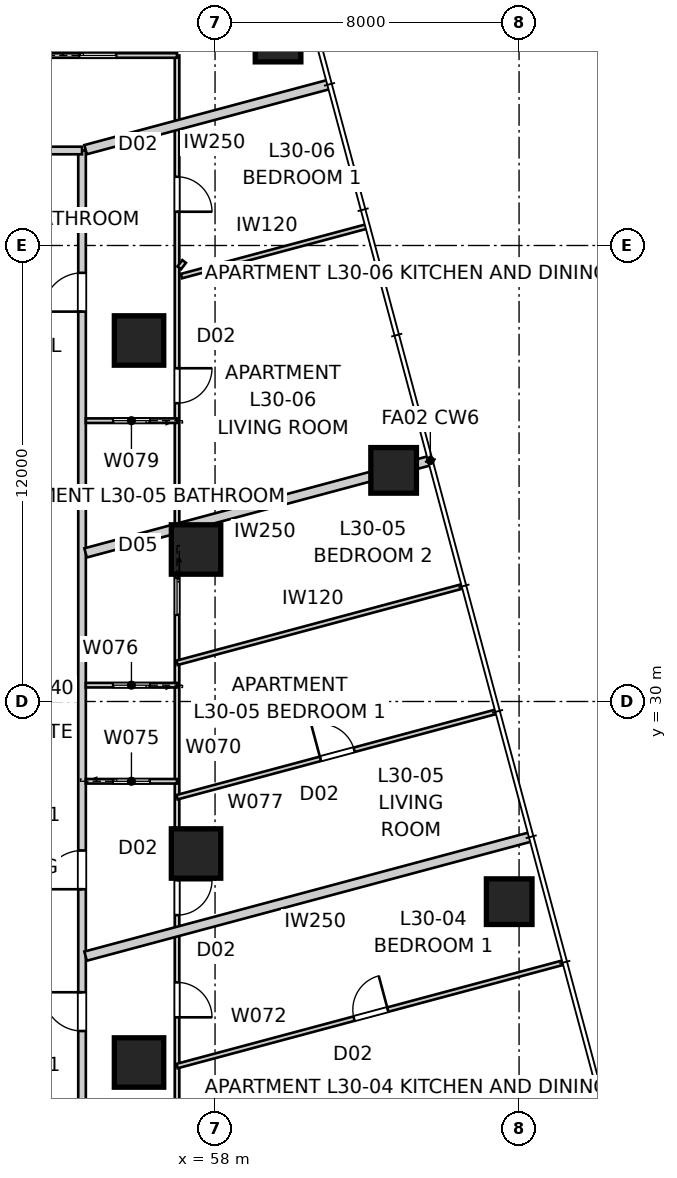
"""IFC4 building model, lengths in metres.
Left out: names, types, materials, properties, quantities, classifications, styles, units other than length and angle.
Written with IfcOpenShell. Run it as: python <this file> out.ifc"""

import sys

from ifc_helpers import new_model, si_unit, direction, frame, frame_2d, origin, origin_2d, place, context, subcontext, project, spatial, rectangle, extrude, element, fill, save


model = new_model("IFC4")
c1 = context("Model", 3, precision=1e-05, world=origin(), true_north=direction((0.0, 1.0)))
c2 = subcontext(c1, "Body", "Model", "MODEL_VIEW")
j1 = project(units=[si_unit("LENGTHUNIT", "METRE"), si_unit("PLANEANGLEUNIT", "RADIAN")], contexts=[c1])
p1 = place(None, origin())
s1 = spatial("IfcSite", under=j1, at=p1, CompositionType="ELEMENT")
p2 = place(p1, origin())
s2 = spatial("IfcBuilding", under=s1, at=p2, CompositionType="ELEMENT")
p3 = place(p2, frame((0.0, 0.0, 111.6)))
s3 = spatial("IfcBuildingStorey", under=s2, at=p3, CompositionType="ELEMENT", Elevation=111.6)
for number, where, z_axis, x_axis in (
    (1, (65.74, 24.733, -0.15), (0.0, 0.0, 1.0), (1.0, 0.0, 0.0)),
    (2, (62.699, 36.082, -0.15), (0.0, 0.0, 1.0), (1.0, 0.0, 0.0)),
    (3, (59.658, 47.432, -0.15), (0.0, 0.0, 1.0), (1.0, 0.0, 0.0)),
):
    element("IfcColumn", number, at=place(p3, frame(where, z_axis=z_axis, x_axis=x_axis)), inside=s3, PredefinedType="COLUMN", context=c2, shape_type="SweptSolid", body=[
        extrude(rectangle(XDim=1.2, YDim=1.2, at=origin_2d()), origin(), (0.0, 0.0, 1.0), 3.55),
    ])
for number, where, z_axis, x_axis in (
    (4, (57.5, 26.0, 0.0), (0.0, 0.0, 1.0), (1.0, 0.0, 0.0)),
    (5, (57.5, 34.0, 0.0), (0.0, 0.0, 1.0), (1.0, 0.0, 0.0)),
    (6, (56.0, 39.5, 0.0), (0.0, 0.0, 1.0), (1.0, 0.0, 0.0)),
    (7, (56.0, 20.5, 0.0), (0.0, 0.0, 1.0), (1.0, 0.0, 0.0)),
):
    element("IfcColumn", number, at=place(p3, frame(where, z_axis=z_axis, x_axis=x_axis)), inside=s3, PredefinedType="COLUMN", context=c2, shape_type="SweptSolid", body=[
        extrude(rectangle(XDim=1.3, YDim=1.3, at=origin_2d()), origin(), (0.0, 0.0, 1.0), 3.4),
    ])
p4 = place(p3, frame((54.5, 15.5, 0.0), z_axis=(0.0, 0.0, 1.0), x_axis=(0.0, 1.0, 0.0)))
e8 = element("IfcWall", 8, at=p4, inside=s3, PredefinedType="PARTITIONING", context=c2, shape_type="SweptSolid", body=[
    extrude(rectangle(XDim=29.0, YDim=0.2, at=frame_2d((14.5, 0.0))), origin(), (0.0, 0.0, 1.0), 3.25),
])
p5 = place(p4, frame((24.76, 0.0, 0.0)))
e9 = element("IfcOpeningElement", 9, at=p5, cuts=e8, PredefinedType="OPENING", context=c2, shape_type="SweptSolid", body=[
    extrude(rectangle(XDim=1.02, YDim=2.1, at=frame_2d((0.51, 1.05))), frame((0.0, 0.11, 0.0), z_axis=(0.0, -1.0, 0.0), x_axis=(1.0, 0.0, 0.0)), (0.0, 0.0, 1.0), 0.22),
])
p6 = place(p4, frame((5.829, 0.0, 0.0)))
e10 = element("IfcOpeningElement", 10, at=p6, cuts=e8, PredefinedType="OPENING", context=c2, shape_type="SweptSolid", body=[
    extrude(rectangle(XDim=1.02, YDim=2.34, at=frame_2d((0.51, 1.17))), frame((0.0, 0.11, 0.0), z_axis=(0.0, -1.0, 0.0), x_axis=(1.0, 0.0, 0.0)), (0.0, 0.0, 1.0), 0.22),
])
p7 = place(p4, frame((9.559, 0.0, 0.0)))
e11 = element("IfcOpeningElement", 11, at=p7, cuts=e8, PredefinedType="OPENING", context=c2, shape_type="SweptSolid", body=[
    extrude(rectangle(XDim=1.02, YDim=2.34, at=frame_2d((0.51, 1.17))), frame((0.0, 0.11, 0.0), z_axis=(0.0, -1.0, 0.0), x_axis=(1.0, 0.0, 0.0)), (0.0, 0.0, 1.0), 0.22),
])
p8 = place(p3, frame((54.5, 44.5, 0.0), z_axis=(0.0, 0.0, 1.0), x_axis=(-1.0, 0.0, 0.0)))
e12 = element("IfcWall", 12, at=p8, inside=s3, PredefinedType="PARTITIONING", context=c2, shape_type="SweptSolid", body=[
    extrude(rectangle(XDim=28.2, YDim=0.2, at=frame_2d((14.1, 0.0))), origin(), (0.0, 0.0, 1.0), 3.25),
])
p9 = place(p8, frame((10.837, 0.0, 0.0)))
e13 = element("IfcOpeningElement", 13, at=p9, cuts=e12, PredefinedType="OPENING", context=c2, shape_type="SweptSolid", body=[
    extrude(rectangle(XDim=1.02, YDim=2.34, at=frame_2d((0.51, 1.17))), frame((0.0, 0.11, 0.0), z_axis=(0.0, -1.0, 0.0), x_axis=(1.0, 0.0, 0.0)), (0.0, 0.0, 1.0), 0.22),
])
p10 = place(p8, frame((5.7, 0.0, 0.0)))
e14 = element("IfcOpeningElement", 14, at=p10, cuts=e12, PredefinedType="OPENING", context=c2, shape_type="SweptSolid", body=[
    extrude(rectangle(XDim=1.02, YDim=2.34, at=frame_2d((0.51, 1.17))), frame((0.0, 0.11, 0.0), z_axis=(0.0, -1.0, 0.0), x_axis=(1.0, 0.0, 0.0)), (0.0, 0.0, 1.0), 0.22),
])
p11 = place(p8, frame((26.127, 0.0, 0.0)))
e15 = element("IfcOpeningElement", 15, at=p11, cuts=e12, PredefinedType="OPENING", context=c2, shape_type="SweptSolid", body=[
    extrude(rectangle(XDim=1.02, YDim=2.34, at=frame_2d((0.51, 1.17))), frame((0.0, 0.11, 0.0), z_axis=(0.0, -1.0, 0.0), x_axis=(1.0, 0.0, 0.0)), (0.0, 0.0, 1.0), 0.22),
])
p12 = place(p3, frame((63.665, 36.341, 0.0), z_axis=(0.0, 0.0, 1.0), x_axis=(-0.965927049013, -0.258814481793, 0.0)))
e16 = element("IfcWall", 16, at=p12, inside=s3, PredefinedType="PARTITIONING", context=c2, shape_type="SweptSolid", body=[
    extrude(rectangle(XDim=9.392, YDim=0.25, at=frame_2d((4.696, 0.0))), origin(), (0.0, 0.0, 1.0), 3.25),
])
p13 = place(p3, frame((66.318, 26.44, 0.0), z_axis=(0.0, 0.0, 1.0), x_axis=(-0.965924438766, -0.258824223352, 0.0)))
e17 = element("IfcWall", 17, at=p13, inside=s3, PredefinedType="PARTITIONING", context=c2, shape_type="SweptSolid", body=[
    extrude(rectangle(XDim=12.138, YDim=0.25, at=frame_2d((6.069, 0.0))), origin(), (0.0, 0.0, 1.0), 3.25),
])
p14 = place(p3, frame((61.012, 46.242, 0.0), z_axis=(0.0, 0.0, 1.0), x_axis=(-0.965929355837, -0.25880587229, 0.0)))
e18 = element("IfcWall", 18, at=p14, inside=s3, PredefinedType="PARTITIONING", context=c2, shape_type="SweptSolid", body=[
    extrude(rectangle(XDim=6.645, YDim=0.25, at=frame_2d((3.322, 0.0))), origin(), (0.0, 0.0, 1.0), 3.25),
])
p15 = place(p3, frame((57.0, 47.0, 0.0), z_axis=(0.0, 0.0, 1.0), x_axis=(0.0, -1.0, 0.0)))
e19 = element("IfcWall", 19, at=p15, inside=s3, PredefinedType="PARTITIONING", context=c2, shape_type="SweptSolid", body=[
    extrude(rectangle(XDim=34.0, YDim=0.12, at=frame_2d((17.0, 0.0))), origin(), (0.0, 0.0, 1.0), 2.55),
])
p16 = place(p15, frame((8.23, 0.0, 0.0)))
e20 = element("IfcOpeningElement", 20, at=p16, cuts=e19, PredefinedType="OPENING", context=c2, shape_type="SweptSolid", body=[
    extrude(rectangle(XDim=0.92, YDim=2.34, at=frame_2d((0.46, 1.17))), frame((0.0, 0.07, 0.0), z_axis=(0.0, -1.0, 0.0), x_axis=(1.0, 0.0, 0.0)), (0.0, 0.0, 1.0), 0.14),
])
p17 = place(p15, frame((3.192, 0.0, 0.0)))
e21 = element("IfcOpeningElement", 21, at=p17, cuts=e19, PredefinedType="OPENING", context=c2, shape_type="SweptSolid", body=[
    extrude(rectangle(XDim=0.92, YDim=2.34, at=frame_2d((0.46, 1.17))), frame((0.0, 0.07, 0.0), z_axis=(0.0, -1.0, 0.0), x_axis=(1.0, 0.0, 0.0)), (0.0, 0.0, 1.0), 0.14),
])
p18 = place(p15, frame((24.391, 0.0, 0.0)))
e22 = element("IfcOpeningElement", 22, at=p18, cuts=e19, PredefinedType="OPENING", context=c2, shape_type="SweptSolid", body=[
    extrude(rectangle(XDim=0.92, YDim=2.34, at=frame_2d((0.46, 1.17))), frame((0.0, 0.07, 0.0), z_axis=(0.0, -1.0, 0.0), x_axis=(1.0, 0.0, 0.0)), (0.0, 0.0, 1.0), 0.14),
])
p19 = place(p15, frame((21.702, 0.0, 0.0)))
e23 = element("IfcOpeningElement", 23, at=p19, cuts=e19, PredefinedType="OPENING", context=c2, shape_type="SweptSolid", body=[
    extrude(rectangle(XDim=0.92, YDim=2.34, at=frame_2d((0.46, 1.17))), frame((0.0, 0.07, 0.0), z_axis=(0.0, -1.0, 0.0), x_axis=(1.0, 0.0, 0.0)), (0.0, 0.0, 1.0), 0.14),
])
p20 = place(p15, frame((31.459, 0.0, 0.0)))
e24 = element("IfcOpeningElement", 24, at=p20, cuts=e19, PredefinedType="OPENING", context=c2, shape_type="SweptSolid", body=[
    extrude(rectangle(XDim=0.96, YDim=2.1, at=frame_2d((0.48, 1.05))), frame((0.0, 0.07, 0.0), z_axis=(0.0, -1.0, 0.0), x_axis=(1.0, 0.0, 0.0)), (0.0, 0.0, 1.0), 0.14),
])
p21 = place(p15, frame((13.759, 0.0, 0.0)))
e25 = element("IfcOpeningElement", 25, at=p21, cuts=e19, PredefinedType="OPENING", context=c2, shape_type="SweptSolid", body=[
    extrude(rectangle(XDim=0.96, YDim=2.1, at=frame_2d((0.48, 1.05))), frame((0.0, 0.07, 0.0), z_axis=(0.0, -1.0, 0.0), x_axis=(1.0, 0.0, 0.0)), (0.0, 0.0, 1.0), 0.14),
])
p22 = place(p3, frame((57.0, 20.406, 0.0), z_axis=(0.0, 0.0, 1.0), x_axis=(0.9659257847, 0.258819200315, 0.0)))
e26 = element("IfcWall", 26, at=p22, inside=s3, PredefinedType="PARTITIONING", context=c2, shape_type="SweptSolid", body=[
    extrude(rectangle(XDim=10.522, YDim=0.12, at=frame_2d((5.261, 0.0))), origin(), (0.0, 0.0, 1.0), 2.722),
])
p23 = place(p22, frame((4.821, 0.0, 0.0)))
e27 = element("IfcOpeningElement", 27, at=p23, cuts=e26, PredefinedType="OPENING", context=c2, shape_type="SweptSolid", body=[
    extrude(rectangle(XDim=0.92, YDim=2.34, at=frame_2d((0.46, 1.17))), frame((0.0, 0.07, 0.0), z_axis=(0.0, -1.0, 0.0), x_axis=(1.0, 0.0, 0.0)), (0.0, 0.0, 1.0), 0.14),
])
p24 = place(p3, frame((54.6, 27.901, 0.0), z_axis=(0.0, 0.0, 1.0), x_axis=(1.0, 0.0, 0.0)))
e28 = element("IfcWall", 28, at=p24, inside=s3, PredefinedType="PARTITIONING", context=c2, shape_type="SweptSolid", body=[
    extrude(rectangle(XDim=2.4, YDim=0.12, at=frame_2d((1.2, 0.0))), origin(), (0.0, 0.0, 1.0), 3.25),
])
p25 = place(p24, frame((0.72, 0.0, 0.0)))
e29 = element("IfcOpeningElement", 29, at=p25, cuts=e28, PredefinedType="OPENING", context=c2, shape_type="SweptSolid", body=[
    extrude(rectangle(XDim=0.96, YDim=2.1, at=frame_2d((0.48, 1.05))), frame((0.0, 0.07, 0.0), z_axis=(0.0, -1.0, 0.0), x_axis=(1.0, 0.0, 0.0)), (0.0, 0.0, 1.0), 0.14),
])
p26 = place(p3, frame((57.0, 30.43, 0.0), z_axis=(0.0, 0.0, 1.0), x_axis=(-1.0, 0.0, 0.0)))
e30 = element("IfcWall", 30, at=p26, inside=s3, PredefinedType="PARTITIONING", context=c2, shape_type="SweptSolid", body=[
    extrude(rectangle(XDim=2.4, YDim=0.12, at=frame_2d((1.2, 0.0))), origin(), (0.0, 0.0, 1.0), 3.25),
])
p27 = place(p26, frame((0.72, 0.0, 0.0)))
e31 = element("IfcOpeningElement", 31, at=p27, cuts=e30, PredefinedType="OPENING", context=c2, shape_type="SweptSolid", body=[
    extrude(rectangle(XDim=0.96, YDim=2.1, at=frame_2d((0.48, 1.05))), frame((0.0, 0.07, 0.0), z_axis=(0.0, -1.0, 0.0), x_axis=(1.0, 0.0, 0.0)), (0.0, 0.0, 1.0), 0.14),
])
p28 = place(p3, frame((57.0, 27.481, 0.0), z_axis=(0.0, 0.0, 1.0), x_axis=(0.965925607751, 0.258819860698, 0.0)))
e32 = element("IfcWall", 32, at=p28, inside=s3, PredefinedType="PARTITIONING", context=c2, shape_type="SweptSolid", body=[
    extrude(rectangle(XDim=8.691, YDim=0.12, at=frame_2d((4.346, 0.0))), origin(), (0.0, 0.0, 1.0), 3.25),
])
p29 = place(p28, frame((3.906, 0.0, 0.0)))
e33 = element("IfcOpeningElement", 33, at=p29, cuts=e32, PredefinedType="OPENING", context=c2, shape_type="SweptSolid", body=[
    extrude(rectangle(XDim=0.92, YDim=2.34, at=frame_2d((0.46, 1.17))), frame((0.0, 0.07, 0.0), z_axis=(0.0, -1.0, 0.0), x_axis=(1.0, 0.0, 0.0)), (0.0, 0.0, 1.0), 0.14),
])
p30 = place(p3, frame((57.0, 31.018, 0.0), z_axis=(0.0, 0.0, 1.0), x_axis=(0.965927309482, 0.258813509689, 0.0)))
e34 = element("IfcWall", 34, at=p30, inside=s3, PredefinedType="PARTITIONING", context=c2, shape_type="SweptSolid", body=[
    extrude(rectangle(XDim=7.776, YDim=0.12, at=frame_2d((3.888, 0.0))), origin(), (0.0, 0.0, 1.0), 3.25),
])
p31 = place(p3, frame((57.0, 37.39, 0.0), z_axis=(0.0, 0.0, 1.0), x_axis=(-1.0, 0.0, 0.0)))
e35 = element("IfcWall", 35, at=p31, inside=s3, PredefinedType="PARTITIONING", context=c2, shape_type="SweptSolid", body=[
    extrude(rectangle(XDim=2.4, YDim=0.12, at=frame_2d((1.2, 0.0))), origin(), (0.0, 0.0, 1.0), 3.25),
])
p32 = place(p31, frame((0.72, 0.0, 0.0)))
e36 = element("IfcOpeningElement", 36, at=p32, cuts=e35, PredefinedType="OPENING", context=c2, shape_type="SweptSolid", body=[
    extrude(rectangle(XDim=0.96, YDim=2.1, at=frame_2d((0.48, 1.05))), frame((0.0, 0.07, 0.0), z_axis=(0.0, -1.0, 0.0), x_axis=(1.0, 0.0, 0.0)), (0.0, 0.0, 1.0), 0.14),
])
p33 = place(p3, frame((57.187, 41.58, 0.0), z_axis=(0.0, 0.0, 1.0), x_axis=(-0.609039064162, -0.793140226142, 0.0)))
e37 = element("IfcWall", 37, at=p33, inside=s3, PredefinedType="PARTITIONING", context=c2, shape_type="SweptSolid", body=[
    extrude(rectangle(XDim=0.211, YDim=0.12, at=frame_2d((0.105, 0.0))), origin(), (0.0, 0.0, 1.0), 3.25),
])
p34 = place(p3, frame((57.116, 41.195, 0.0), z_axis=(0.0, 0.0, 1.0), x_axis=(0.965921615375, 0.258834759935, 0.0)))
e38 = element("IfcWall", 38, at=p34, inside=s3, PredefinedType="PARTITIONING", context=c2, shape_type="SweptSolid", body=[
    extrude(rectangle(XDim=5.029, YDim=0.12, at=frame_2d((2.515, 0.0))), origin(), (0.0, 0.0, 1.0), 2.722),
])
p35 = place(p3, frame((50.853, 47.0, 0.0), z_axis=(0.0, 0.0, 1.0), x_axis=(1.0, 0.0, 0.0)))
e39 = element("IfcWall", 39, at=p35, inside=s3, PredefinedType="PARTITIONING", context=c2, shape_type="SweptSolid", body=[
    extrude(rectangle(XDim=6.147, YDim=0.12, at=frame_2d((3.074, 0.0))), origin(), (0.0, 0.0, 1.0), 3.25),
])
p36 = place(p35, frame((3.585, 0.0, 0.0)))
e40 = element("IfcOpeningElement", 40, at=p36, cuts=e39, PredefinedType="OPENING", context=c2, shape_type="SweptSolid", body=[
    extrude(rectangle(XDim=0.96, YDim=2.1, at=frame_2d((0.48, 1.05))), frame((0.0, 0.07, 0.0), z_axis=(0.0, -1.0, 0.0), x_axis=(1.0, 0.0, 0.0)), (0.0, 0.0, 1.0), 0.14),
])
p37 = place(p3, frame((60.089, 49.532, 0.0), z_axis=(0.0, 0.0, 1.0), x_axis=(-0.965927203676, -0.25881390457, 0.0)))
e41 = element("IfcWall", 41, at=p37, inside=s3, PredefinedType="PARTITIONING", context=c2, shape_type="SweptSolid", body=[
    extrude(rectangle(XDim=9.357, YDim=0.12, at=frame_2d((4.678, 0.0))), origin(), (0.0, 0.0, 1.0), 2.638),
])
p38 = place(p5, origin())
e42 = element("IfcDoor", 42, at=p38, inside=s3, OperationType="SINGLE_SWING_LEFT", PredefinedType="DOOR", context=c2, shape_type="SweptSolid", body=[
    extrude(rectangle(XDim=1.02, YDim=2.1, at=frame_2d((0.51, 1.05))), frame((0.0, 0.025, 0.0), z_axis=(0.0, -1.0, 0.0), x_axis=(1.0, 0.0, 0.0)), (0.0, 0.0, 1.0), 0.05),
])
fill(e9, e42)
p39 = place(p6, origin())
e43 = element("IfcDoor", 43, at=p39, inside=s3, OperationType="SINGLE_SWING_RIGHT", PredefinedType="DOOR", context=c2, shape_type="SweptSolid", body=[
    extrude(rectangle(XDim=1.02, YDim=2.34, at=frame_2d((0.51, 1.17))), frame((0.0, 0.025, 0.0), z_axis=(0.0, -1.0, 0.0), x_axis=(1.0, 0.0, 0.0)), (0.0, 0.0, 1.0), 0.05),
])
fill(e10, e43)
p40 = place(p7, origin())
e44 = element("IfcDoor", 44, at=p40, inside=s3, OperationType="SINGLE_SWING_LEFT", PredefinedType="DOOR", context=c2, shape_type="SweptSolid", body=[
    extrude(rectangle(XDim=1.02, YDim=2.34, at=frame_2d((0.51, 1.17))), frame((0.0, 0.025, 0.0), z_axis=(0.0, -1.0, 0.0), x_axis=(1.0, 0.0, 0.0)), (0.0, 0.0, 1.0), 0.05),
])
fill(e11, e44)
p41 = place(p16, origin())
e45 = element("IfcDoor", 45, at=p41, inside=s3, OperationType="SINGLE_SWING_LEFT", PredefinedType="DOOR", context=c2, shape_type="SweptSolid", body=[
    extrude(rectangle(XDim=0.92, YDim=2.34, at=frame_2d((0.46, 1.17))), frame((0.0, 0.025, 0.0), z_axis=(0.0, -1.0, 0.0), x_axis=(1.0, 0.0, 0.0)), (0.0, 0.0, 1.0), 0.05),
])
fill(e20, e45)
p42 = place(p17, origin())
e46 = element("IfcDoor", 46, at=p42, inside=s3, OperationType="SINGLE_SWING_RIGHT", PredefinedType="DOOR", context=c2, shape_type="SweptSolid", body=[
    extrude(rectangle(XDim=0.92, YDim=2.34, at=frame_2d((0.46, 1.17))), frame((0.0, 0.025, 0.0), z_axis=(0.0, -1.0, 0.0), x_axis=(1.0, 0.0, 0.0)), (0.0, 0.0, 1.0), 0.05),
])
fill(e21, e46)
p43 = place(p32, origin())
e47 = element("IfcDoor", 47, at=p43, inside=s3, OperationType="SLIDING_TO_LEFT", PredefinedType="DOOR", context=c2, shape_type="SweptSolid", body=[
    extrude(rectangle(XDim=0.96, YDim=2.1, at=frame_2d((0.48, 1.05))), frame((0.0, 0.025, 0.0), z_axis=(0.0, -1.0, 0.0), x_axis=(1.0, 0.0, 0.0)), (0.0, 0.0, 1.0), 0.05),
])
fill(e36, e47)
p44 = place(p18, origin())
e48 = element("IfcDoor", 48, at=p44, inside=s3, OperationType="SINGLE_SWING_RIGHT", PredefinedType="DOOR", context=c2, shape_type="SweptSolid", body=[
    extrude(rectangle(XDim=0.92, YDim=2.34, at=frame_2d((0.46, 1.17))), frame((0.0, 0.025, 0.0), z_axis=(0.0, -1.0, 0.0), x_axis=(1.0, 0.0, 0.0)), (0.0, 0.0, 1.0), 0.05),
])
fill(e22, e48)
p45 = place(p19, origin())
e49 = element("IfcDoor", 49, at=p45, inside=s3, OperationType="SINGLE_SWING_LEFT", PredefinedType="DOOR", context=c2, shape_type="SweptSolid", body=[
    extrude(rectangle(XDim=0.92, YDim=2.34, at=frame_2d((0.46, 1.17))), frame((0.0, 0.025, 0.0), z_axis=(0.0, -1.0, 0.0), x_axis=(1.0, 0.0, 0.0)), (0.0, 0.0, 1.0), 0.05),
])
fill(e23, e49)
p46 = place(p25, origin())
e50 = element("IfcDoor", 50, at=p46, inside=s3, OperationType="SLIDING_TO_LEFT", PredefinedType="DOOR", context=c2, shape_type="SweptSolid", body=[
    extrude(rectangle(XDim=0.96, YDim=2.1, at=frame_2d((0.48, 1.05))), frame((0.0, 0.025, 0.0), z_axis=(0.0, -1.0, 0.0), x_axis=(1.0, 0.0, 0.0)), (0.0, 0.0, 1.0), 0.05),
])
fill(e29, e50)
p47 = place(p36, origin())
e51 = element("IfcDoor", 51, at=p47, inside=s3, OperationType="SLIDING_TO_LEFT", PredefinedType="DOOR", context=c2, shape_type="SweptSolid", body=[
    extrude(rectangle(XDim=0.96, YDim=2.1, at=frame_2d((0.48, 1.05))), frame((0.0, 0.025, 0.0), z_axis=(0.0, -1.0, 0.0), x_axis=(1.0, 0.0, 0.0)), (0.0, 0.0, 1.0), 0.05),
])
fill(e40, e51)
p48 = place(p29, origin())
e52 = element("IfcDoor", 52, at=p48, inside=s3, OperationType="SINGLE_SWING_LEFT", PredefinedType="DOOR", context=c2, shape_type="SweptSolid", body=[
    extrude(rectangle(XDim=0.92, YDim=2.34, at=frame_2d((0.46, 1.17))), frame((0.0, 0.025, 0.0), z_axis=(0.0, -1.0, 0.0), x_axis=(1.0, 0.0, 0.0)), (0.0, 0.0, 1.0), 0.05),
])
fill(e33, e52)
p49 = place(p27, origin())
e53 = element("IfcDoor", 53, at=p49, inside=s3, OperationType="SLIDING_TO_LEFT", PredefinedType="DOOR", context=c2, shape_type="SweptSolid", body=[
    extrude(rectangle(XDim=0.96, YDim=2.1, at=frame_2d((0.48, 1.05))), frame((0.0, 0.025, 0.0), z_axis=(0.0, -1.0, 0.0), x_axis=(1.0, 0.0, 0.0)), (0.0, 0.0, 1.0), 0.05),
])
fill(e31, e53)
p50 = place(p21, origin())
e54 = element("IfcDoor", 54, at=p50, inside=s3, OperationType="SLIDING_TO_LEFT", PredefinedType="DOOR", context=c2, shape_type="SweptSolid", body=[
    extrude(rectangle(XDim=0.96, YDim=2.1, at=frame_2d((0.48, 1.05))), frame((0.0, 0.025, 0.0), z_axis=(0.0, -1.0, 0.0), x_axis=(1.0, 0.0, 0.0)), (0.0, 0.0, 1.0), 0.05),
])
fill(e25, e54)
p51 = place(p23, origin())
e55 = element("IfcDoor", 55, at=p51, inside=s3, OperationType="SINGLE_SWING_RIGHT", PredefinedType="DOOR", context=c2, shape_type="SweptSolid", body=[
    extrude(rectangle(XDim=0.92, YDim=2.34, at=frame_2d((0.46, 1.17))), frame((0.0, 0.025, 0.0), z_axis=(0.0, -1.0, 0.0), x_axis=(1.0, 0.0, 0.0)), (0.0, 0.0, 1.0), 0.05),
])
fill(e27, e55)
save(model, sys.argv[1])
